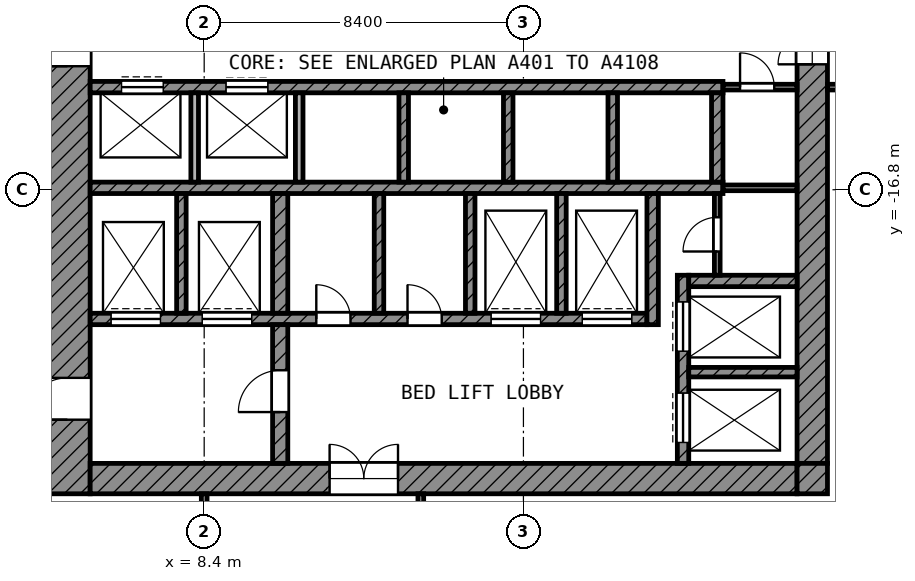
"""IFC4 building model, lengths in metres.
Left out: names, types, materials, properties, quantities, classifications, styles, units other than length and angle.
Written with IfcOpenShell. Run it as: python <this file> out.ifc"""

import sys

from ifc_helpers import new_model, si_unit, direction, frame, frame_2d, origin, place, context, subcontext, project, spatial, rectangle, extrude, element, fill, save


model = new_model("IFC4")
c1 = context("Model", 3, precision=1e-05, world=origin(), true_north=direction((0.0, 1.0)))
c2 = subcontext(c1, "Body", "Model", "MODEL_VIEW")
j1 = project(units=[si_unit("LENGTHUNIT", "METRE"), si_unit("PLANEANGLEUNIT", "RADIAN")], contexts=[c1])
p1 = place(None, origin())
s1 = spatial("IfcSite", under=j1, at=p1, CompositionType="ELEMENT")
p2 = place(p1, origin())
s2 = spatial("IfcBuilding", under=s1, at=p2, CompositionType="ELEMENT")
p3 = place(p2, frame((0.0, 0.0, 239.0)))
s3 = spatial("IfcBuildingStorey", under=s2, at=p3, CompositionType="ELEMENT", Elevation=239.0)
p4 = place(p3, frame((4.8, -24.8, 0.0), z_axis=(0.0, 0.0, 1.0), x_axis=(0.0, 1.0, 0.0)))
e1 = element("IfcWall", 1, at=p4, inside=s3, PredefinedType="SHEAR", context=c2, shape_type="SweptSolid", body=[
    extrude(rectangle(XDim=19.4, YDim=1.2, at=frame_2d((9.7, 0.0))), origin(), (0.0, 0.0, 1.0), 3.6),
])
p5 = place(p4, frame((11.25, 0.0, 0.0)))
e2 = element("IfcOpeningElement", 2, at=p5, cuts=e1, PredefinedType="OPENING", context=c2, shape_type="SweptSolid", body=[
    extrude(rectangle(XDim=1.1, YDim=2.1, at=frame_2d((0.55, 1.05))), frame((0.0, 0.61, 0.0), z_axis=(0.0, -1.0, 0.0), x_axis=(1.0, 0.0, 0.0)), (0.0, 0.0, 1.0), 1.22),
])
p6 = place(p4, frame((1.95, 0.0, 0.0)))
e3 = element("IfcOpeningElement", 3, at=p6, cuts=e1, PredefinedType="OPENING", context=c2, shape_type="SweptSolid", body=[
    extrude(rectangle(XDim=1.1, YDim=2.1, at=frame_2d((0.55, 1.05))), frame((0.0, 0.61, 0.0), z_axis=(0.0, -1.0, 0.0), x_axis=(1.0, 0.0, 0.0)), (0.0, 0.0, 1.0), 1.22),
])
p7 = place(p3, frame((24.4, -24.0, 0.0), z_axis=(0.0, 0.0, 1.0), x_axis=(0.0, 1.0, 0.0)))
e4 = element("IfcWall", 4, at=p7, inside=s3, PredefinedType="SHEAR", context=c2, shape_type="SweptSolid", body=[
    extrude(rectangle(XDim=18.6, YDim=0.8, at=frame_2d((9.3, 0.0))), origin(), (0.0, 0.0, 1.0), 3.6),
])
p8 = place(p7, frame((10.5, 0.0, 0.0)))
e5 = element("IfcOpeningElement", 5, at=p8, cuts=e4, PredefinedType="OPENING", context=c2, shape_type="SweptSolid", body=[
    extrude(rectangle(XDim=1.8, YDim=2.1, at=frame_2d((0.9, 1.05))), frame((0.0, 0.41, 0.0), z_axis=(0.0, -1.0, 0.0), x_axis=(1.0, 0.0, 0.0)), (0.0, 0.0, 1.0), 0.82),
])
p9 = place(p3, frame((5.4, -24.4, 0.0), z_axis=(0.0, 0.0, 1.0), x_axis=(1.0, 0.0, 0.0)))
e6 = element("IfcWall", 6, at=p9, inside=s3, PredefinedType="SHEAR", context=c2, shape_type="SweptSolid", body=[
    extrude(rectangle(XDim=18.6, YDim=0.8, at=frame_2d((9.3, 0.0))), origin(), (0.0, 0.0, 1.0), 3.6),
])
p10 = place(p9, frame((6.3, 0.0, 0.0)))
e7 = element("IfcOpeningElement", 7, at=p10, cuts=e6, PredefinedType="OPENING", context=c2, shape_type="SweptSolid", body=[
    extrude(rectangle(XDim=1.8, YDim=2.1, at=frame_2d((0.9, 1.05))), frame((0.0, 0.41, 0.0), z_axis=(0.0, -1.0, 0.0), x_axis=(1.0, 0.0, 0.0)), (0.0, 0.0, 1.0), 0.82),
])
p11 = place(p3, frame((24.4, -24.8, 0.0), z_axis=(0.0, 0.0, 1.0), x_axis=(0.0, 1.0, 0.0)))
e8 = element("IfcWall", 8, at=p11, inside=s3, PredefinedType="SHEAR", context=c2, shape_type="SweptSolid", body=[
    extrude(rectangle(XDim=0.8, YDim=0.8, at=frame_2d((0.4, 0.0))), origin(), (0.0, 0.0, 1.0), 3.6),
])
p12 = place(p3, frame((5.4, -14.1, 0.0), z_axis=(0.0, 0.0, 1.0), x_axis=(1.0, 0.0, 0.0)))
e9 = element("IfcWall", 9, at=p12, inside=s3, PredefinedType="SHEAR", context=c2, shape_type="SweptSolid", body=[
    extrude(rectangle(XDim=16.65, YDim=0.3, at=frame_2d((8.325, 0.0))), origin(), (0.0, 0.0, 1.0), 3.6),
])
p13 = place(p12, frame((0.825, 0.0, 0.0)))
e10 = element("IfcOpeningElement", 10, at=p13, cuts=e9, PredefinedType="OPENING", context=c2, shape_type="SweptSolid", body=[
    extrude(rectangle(XDim=1.1, YDim=2.1, at=frame_2d((0.55, 1.05))), frame((0.0, 0.16, 0.0), z_axis=(0.0, -1.0, 0.0), x_axis=(1.0, 0.0, 0.0)), (0.0, 0.0, 1.0), 0.32),
])
p14 = place(p12, frame((3.575, 0.0, 0.0)))
e11 = element("IfcOpeningElement", 11, at=p14, cuts=e9, PredefinedType="OPENING", context=c2, shape_type="SweptSolid", body=[
    extrude(rectangle(XDim=1.1, YDim=2.1, at=frame_2d((0.55, 1.05))), frame((0.0, 0.16, 0.0), z_axis=(0.0, -1.0, 0.0), x_axis=(1.0, 0.0, 0.0)), (0.0, 0.0, 1.0), 0.32),
])
p15 = place(p3, frame((5.4, -16.75, 0.0), z_axis=(0.0, 0.0, 1.0), x_axis=(1.0, 0.0, 0.0)))
e12 = element("IfcWall", 12, at=p15, inside=s3, PredefinedType="SHEAR", context=c2, shape_type="SweptSolid", body=[
    extrude(rectangle(XDim=16.65, YDim=0.3, at=frame_2d((8.325, 0.0))), origin(), (0.0, 0.0, 1.0), 3.6),
])
p16 = place(p3, frame((5.4, -20.2, 0.0), z_axis=(0.0, 0.0, 1.0), x_axis=(1.0, 0.0, 0.0)))
e13 = element("IfcWall", 13, at=p16, inside=s3, PredefinedType="SHEAR", context=c2, shape_type="SweptSolid", body=[
    extrude(rectangle(XDim=14.65, YDim=0.3, at=frame_2d((7.325, 0.0))), origin(), (0.0, 0.0, 1.0), 3.6),
])
p17 = place(p16, frame((10.55, 0.0, 0.0)))
e14 = element("IfcOpeningElement", 14, at=p17, cuts=e13, PredefinedType="OPENING", context=c2, shape_type="SweptSolid", body=[
    extrude(rectangle(XDim=1.3, YDim=2.1, at=frame_2d((0.65, 1.05))), frame((0.0, 0.16, 0.0), z_axis=(0.0, -1.0, 0.0), x_axis=(1.0, 0.0, 0.0)), (0.0, 0.0, 1.0), 0.32),
])
p18 = place(p16, frame((12.95, 0.0, 0.0)))
e15 = element("IfcOpeningElement", 15, at=p18, cuts=e13, PredefinedType="OPENING", context=c2, shape_type="SweptSolid", body=[
    extrude(rectangle(XDim=1.3, YDim=2.1, at=frame_2d((0.65, 1.05))), frame((0.0, 0.16, 0.0), z_axis=(0.0, -1.0, 0.0), x_axis=(1.0, 0.0, 0.0)), (0.0, 0.0, 1.0), 0.32),
])
p19 = place(p16, frame((0.55, 0.0, 0.0)))
e16 = element("IfcOpeningElement", 16, at=p19, cuts=e13, PredefinedType="OPENING", context=c2, shape_type="SweptSolid", body=[
    extrude(rectangle(XDim=1.3, YDim=2.1, at=frame_2d((0.65, 1.05))), frame((0.0, 0.16, 0.0), z_axis=(0.0, -1.0, 0.0), x_axis=(1.0, 0.0, 0.0)), (0.0, 0.0, 1.0), 0.32),
])
p20 = place(p16, frame((2.95, 0.0, 0.0)))
e17 = element("IfcOpeningElement", 17, at=p20, cuts=e13, PredefinedType="OPENING", context=c2, shape_type="SweptSolid", body=[
    extrude(rectangle(XDim=1.3, YDim=2.1, at=frame_2d((0.65, 1.05))), frame((0.0, 0.16, 0.0), z_axis=(0.0, -1.0, 0.0), x_axis=(1.0, 0.0, 0.0)), (0.0, 0.0, 1.0), 0.32),
])
p21 = place(p16, frame((5.95, 0.0, 0.0)))
e18 = element("IfcOpeningElement", 18, at=p21, cuts=e13, PredefinedType="OPENING", context=c2, shape_type="SweptSolid", body=[
    extrude(rectangle(XDim=0.9, YDim=2.1, at=frame_2d((0.45, 1.05))), frame((0.0, 0.16, 0.0), z_axis=(0.0, -1.0, 0.0), x_axis=(1.0, 0.0, 0.0)), (0.0, 0.0, 1.0), 0.32),
])
p22 = place(p16, frame((8.35, 0.0, 0.0)))
e19 = element("IfcOpeningElement", 19, at=p22, cuts=e13, PredefinedType="OPENING", context=c2, shape_type="SweptSolid", body=[
    extrude(rectangle(XDim=0.9, YDim=2.1, at=frame_2d((0.45, 1.05))), frame((0.0, 0.16, 0.0), z_axis=(0.0, -1.0, 0.0), x_axis=(1.0, 0.0, 0.0)), (0.0, 0.0, 1.0), 0.32),
])
p23 = place(p3, frame((10.4, -24.0, 0.0), z_axis=(0.0, 0.0, 1.0), x_axis=(0.0, 1.0, 0.0)))
e20 = element("IfcWall", 20, at=p23, inside=s3, PredefinedType="SHEAR", context=c2, shape_type="SweptSolid", body=[
    extrude(rectangle(XDim=3.65, YDim=0.4, at=frame_2d((1.825, 0.0))), origin(), (0.0, 0.0, 1.0), 3.6),
])
p24 = place(p23, frame((1.35, 0.0, 0.0)))
e21 = element("IfcOpeningElement", 21, at=p24, cuts=e20, PredefinedType="OPENING", context=c2, shape_type="SweptSolid", body=[
    extrude(rectangle(XDim=1.1, YDim=2.1, at=frame_2d((0.55, 1.05))), frame((0.0, 0.21, 0.0), z_axis=(0.0, -1.0, 0.0), x_axis=(1.0, 0.0, 0.0)), (0.0, 0.0, 1.0), 0.42),
])
p25 = place(p3, frame((10.4, -20.05, 0.0), z_axis=(0.0, 0.0, 1.0), x_axis=(0.0, 1.0, 0.0)))
e22 = element("IfcWall", 22, at=p25, inside=s3, PredefinedType="SHEAR", context=c2, shape_type="SweptSolid", body=[
    extrude(rectangle(XDim=3.15, YDim=0.4, at=frame_2d((1.575, 0.0))), origin(), (0.0, 0.0, 1.0), 3.6),
])
p26 = place(p3, frame((20.2, -20.35, 0.0), z_axis=(0.0, 0.0, 1.0), x_axis=(0.0, 1.0, 0.0)))
e23 = element("IfcWall", 23, at=p26, inside=s3, PredefinedType="SHEAR", context=c2, shape_type="SweptSolid", body=[
    extrude(rectangle(XDim=3.45, YDim=0.3, at=frame_2d((1.725, 0.0))), origin(), (0.0, 0.0, 1.0), 3.6),
])
p27 = place(p3, frame((21.9, -16.6, 0.0), z_axis=(0.0, 0.0, 1.0), x_axis=(0.0, 1.0, 0.0)))
e24 = element("IfcWall", 24, at=p27, inside=s3, PredefinedType="SHEAR", context=c2, shape_type="SweptSolid", body=[
    extrude(rectangle(XDim=2.35, YDim=0.3, at=frame_2d((1.175, 0.0))), origin(), (0.0, 0.0, 1.0), 3.6),
])
p28 = place(p3, frame((21.15, -19.2, 0.0), z_axis=(0.0, 0.0, 1.0), x_axis=(1.0, 0.0, 0.0)))
e25 = element("IfcWall", 25, at=p28, inside=s3, PredefinedType="SHEAR", context=c2, shape_type="SweptSolid", body=[
    extrude(rectangle(XDim=2.85, YDim=0.3, at=frame_2d((1.425, 0.0))), origin(), (0.0, 0.0, 1.0), 3.6),
])
p29 = place(p3, frame((21.0, -24.0, 0.0), z_axis=(0.0, 0.0, 1.0), x_axis=(0.0, 1.0, 0.0)))
e26 = element("IfcWall", 26, at=p29, inside=s3, PredefinedType="SHEAR", context=c2, shape_type="SweptSolid", body=[
    extrude(rectangle(XDim=4.95, YDim=0.3, at=frame_2d((2.475, 0.0))), origin(), (0.0, 0.0, 1.0), 3.6),
])
p30 = place(p29, frame((2.95, 0.0, 0.0)))
e27 = element("IfcOpeningElement", 27, at=p30, cuts=e26, PredefinedType="OPENING", context=c2, shape_type="SweptSolid", body=[
    extrude(rectangle(XDim=1.3, YDim=2.1, at=frame_2d((0.65, 1.05))), frame((0.0, 0.16, 0.0), z_axis=(0.0, -1.0, 0.0), x_axis=(1.0, 0.0, 0.0)), (0.0, 0.0, 1.0), 0.32),
])
p31 = place(p29, frame((0.55, 0.0, 0.0)))
e28 = element("IfcOpeningElement", 28, at=p31, cuts=e26, PredefinedType="OPENING", context=c2, shape_type="SweptSolid", body=[
    extrude(rectangle(XDim=1.3, YDim=2.1, at=frame_2d((0.65, 1.05))), frame((0.0, 0.16, 0.0), z_axis=(0.0, -1.0, 0.0), x_axis=(1.0, 0.0, 0.0)), (0.0, 0.0, 1.0), 0.32),
])
p32 = place(p3, frame((21.15, -21.6, 0.0), z_axis=(0.0, 0.0, 1.0), x_axis=(1.0, 0.0, 0.0)))
e29 = element("IfcWall", 29, at=p32, inside=s3, PredefinedType="SHEAR", context=c2, shape_type="SweptSolid", body=[
    extrude(rectangle(XDim=2.85, YDim=0.25, at=frame_2d((1.425, 0.0))), origin(), (0.0, 0.0, 1.0), 3.6),
])
for number, where, z_axis, x_axis in (
    (30, (7.8, -20.05, 0.0), (0.0, 0.0, 1.0), (0.0, 1.0, 0.0)),
    (31, (13.0, -20.05, 0.0), (0.0, 0.0, 1.0), (0.0, 1.0, 0.0)),
    (32, (15.4, -20.05, 0.0), (0.0, 0.0, 1.0), (0.0, 1.0, 0.0)),
    (33, (17.8, -20.05, 0.0), (0.0, 0.0, 1.0), (0.0, 1.0, 0.0)),
):
    element("IfcWall", number, at=place(p3, frame(where, z_axis=z_axis, x_axis=x_axis)), inside=s3, PredefinedType="SHEAR", context=c2, shape_type="SweptSolid", body=[
        extrude(rectangle(XDim=3.15, YDim=0.25, at=frame_2d((1.575, 0.0))), origin(), (0.0, 0.0, 1.0), 3.6),
    ])
for number, where, z_axis, x_axis in (
    (34, (8.15, -16.6, 0.0), (0.0, 0.0, 1.0), (0.0, 1.0, 0.0)),
    (35, (10.9, -16.6, 0.0), (0.0, 0.0, 1.0), (0.0, 1.0, 0.0)),
):
    element("IfcWall", number, at=place(p3, frame(where, z_axis=z_axis, x_axis=x_axis)), inside=s3, PredefinedType="PARTITIONING", context=c2, shape_type="SweptSolid", body=[
        extrude(rectangle(XDim=2.35, YDim=0.2, at=frame_2d((1.175, 0.0))), origin(), (0.0, 0.0, 1.0), 3.6),
    ])
for number, where, z_axis, x_axis in (
    (36, (13.65, -16.6, 0.0), (0.0, 0.0, 1.0), (0.0, 1.0, 0.0)),
    (37, (16.4, -16.6, 0.0), (0.0, 0.0, 1.0), (0.0, 1.0, 0.0)),
    (38, (19.15, -16.6, 0.0), (0.0, 0.0, 1.0), (0.0, 1.0, 0.0)),
):
    element("IfcWall", number, at=place(p3, frame(where, z_axis=z_axis, x_axis=x_axis)), inside=s3, PredefinedType="SHEAR", context=c2, shape_type="SweptSolid", body=[
        extrude(rectangle(XDim=2.35, YDim=0.25, at=frame_2d((1.175, 0.0))), origin(), (0.0, 0.0, 1.0), 3.6),
    ])
p33 = place(p3, frame((21.9, -19.05, 0.0), z_axis=(0.0, 0.0, 1.0), x_axis=(0.0, 1.0, 0.0)))
e39 = element("IfcWall", 39, at=p33, inside=s3, PredefinedType="PARTITIONING", context=c2, shape_type="SweptSolid", body=[
    extrude(rectangle(XDim=2.15, YDim=0.15, at=frame_2d((1.075, 0.0))), origin(), (0.0, 0.0, 1.0), 3.6),
])
p34 = place(p33, frame((0.625, 0.0, 0.0)))
e40 = element("IfcOpeningElement", 40, at=p34, cuts=e39, PredefinedType="OPENING", context=c2, shape_type="SweptSolid", body=[
    extrude(rectangle(XDim=0.9, YDim=2.1, at=frame_2d((0.45, 1.05))), frame((0.0, 0.085, 0.0), z_axis=(0.0, -1.0, 0.0), x_axis=(1.0, 0.0, 0.0)), (0.0, 0.0, 1.0), 0.17),
])
p35 = place(p3, frame((22.05, -16.75, 0.0), z_axis=(0.0, 0.0, 1.0), x_axis=(1.0, 0.0, 0.0)))
e41 = element("IfcWall", 41, at=p35, inside=s3, PredefinedType="PARTITIONING", context=c2, shape_type="SweptSolid", body=[
    extrude(rectangle(XDim=1.95, YDim=0.15, at=frame_2d((0.975, 0.0))), origin(), (0.0, 0.0, 1.0), 3.6),
])
p36 = place(p3, frame((22.05, -14.1, 0.0), z_axis=(0.0, 0.0, 1.0), x_axis=(1.0, 0.0, 0.0)))
e42 = element("IfcWall", 42, at=p36, inside=s3, PredefinedType="PARTITIONING", context=c2, shape_type="SweptSolid", body=[
    extrude(rectangle(XDim=1.95, YDim=0.15, at=frame_2d((0.975, 0.0))), origin(), (0.0, 0.0, 1.0), 3.6),
])
p37 = place(p36, frame((0.45, 0.0, 0.0)))
e43 = element("IfcOpeningElement", 43, at=p37, cuts=e42, PredefinedType="OPENING", context=c2, shape_type="SweptSolid", body=[
    extrude(rectangle(XDim=0.9, YDim=2.1, at=frame_2d((0.45, 1.05))), frame((0.0, 0.085, 0.0), z_axis=(0.0, -1.0, 0.0), x_axis=(1.0, 0.0, 0.0)), (0.0, 0.0, 1.0), 0.17),
])
p38 = place(p3, frame((24.8, -14.1, 0.0), z_axis=(0.0, 0.0, 1.0), x_axis=(1.0, 0.0, 0.0)))
e44 = element("IfcWall", 44, at=p38, inside=s3, PredefinedType="PARTITIONING", context=c2, shape_type="SweptSolid", body=[
    extrude(rectangle(XDim=4.525, YDim=0.15, at=frame_2d((2.262, 0.0))), origin(), (0.0, 0.0, 1.0), 3.6),
])
p39 = place(p38, frame((1.75, 0.0, 0.0)))
e45 = element("IfcOpeningElement", 45, at=p39, cuts=e44, PredefinedType="OPENING", context=c2, shape_type="SweptSolid", body=[
    extrude(rectangle(XDim=1.5, YDim=2.1, at=frame_2d((0.75, 1.05))), frame((0.0, 0.085, 0.0), z_axis=(0.0, -1.0, 0.0), x_axis=(1.0, 0.0, 0.0)), (0.0, 0.0, 1.0), 0.17),
])
p40 = place(p3, frame((8.4, -31.907, 0.0), z_axis=(0.0, 0.0, 1.0), x_axis=(0.0, 1.0, 0.0)))
e46 = element("IfcWall", 46, at=p40, inside=s3, PredefinedType="PARTITIONING", context=c2, shape_type="SweptSolid", body=[
    extrude(rectangle(XDim=7.107, YDim=0.15, at=frame_2d((3.553, 0.0))), origin(), (0.0, 0.0, 1.0), 3.6),
])
p41 = place(p3, frame((14.1, -29.325, 0.0), z_axis=(0.0, 0.0, 1.0), x_axis=(0.0, 1.0, 0.0)))
e47 = element("IfcWall", 47, at=p41, inside=s3, PredefinedType="PARTITIONING", context=c2, shape_type="SweptSolid", body=[
    extrude(rectangle(XDim=4.525, YDim=0.15, at=frame_2d((2.262, 0.0))), origin(), (0.0, 0.0, 1.0), 3.6),
])
p42 = place(p13, origin())
e48 = element("IfcDoor", 48, at=p42, inside=s3, OperationType="DOUBLE_DOOR_SLIDING", PredefinedType="DOOR", context=c2, shape_type="SweptSolid", body=[
    extrude(rectangle(XDim=1.1, YDim=2.1, at=frame_2d((0.55, 1.05))), frame((0.0, 0.025, 0.0), z_axis=(0.0, -1.0, 0.0), x_axis=(1.0, 0.0, 0.0)), (0.0, 0.0, 1.0), 0.05),
])
fill(e10, e48)
p43 = place(p14, origin())
e49 = element("IfcDoor", 49, at=p43, inside=s3, OperationType="DOUBLE_DOOR_SLIDING", PredefinedType="DOOR", context=c2, shape_type="SweptSolid", body=[
    extrude(rectangle(XDim=1.1, YDim=2.1, at=frame_2d((0.55, 1.05))), frame((0.0, 0.025, 0.0), z_axis=(0.0, -1.0, 0.0), x_axis=(1.0, 0.0, 0.0)), (0.0, 0.0, 1.0), 0.05),
])
fill(e11, e49)
p44 = place(p30, origin())
e50 = element("IfcDoor", 50, at=p44, inside=s3, OperationType="DOUBLE_DOOR_SLIDING", PredefinedType="DOOR", context=c2, shape_type="SweptSolid", body=[
    extrude(rectangle(XDim=1.3, YDim=2.1, at=frame_2d((0.65, 1.05))), frame((0.0, 0.025, 0.0), z_axis=(0.0, -1.0, 0.0), x_axis=(1.0, 0.0, 0.0)), (0.0, 0.0, 1.0), 0.05),
])
fill(e27, e50)
p45 = place(p31, origin())
e51 = element("IfcDoor", 51, at=p45, inside=s3, OperationType="DOUBLE_DOOR_SLIDING", PredefinedType="DOOR", context=c2, shape_type="SweptSolid", body=[
    extrude(rectangle(XDim=1.3, YDim=2.1, at=frame_2d((0.65, 1.05))), frame((0.0, 0.025, 0.0), z_axis=(0.0, -1.0, 0.0), x_axis=(1.0, 0.0, 0.0)), (0.0, 0.0, 1.0), 0.05),
])
fill(e28, e51)
p46 = place(p17, origin())
e52 = element("IfcDoor", 52, at=p46, inside=s3, OperationType="DOUBLE_DOOR_SLIDING", PredefinedType="DOOR", context=c2, shape_type="SweptSolid", body=[
    extrude(rectangle(XDim=1.3, YDim=2.1, at=frame_2d((0.65, 1.05))), frame((0.0, 0.025, 0.0), z_axis=(0.0, -1.0, 0.0), x_axis=(1.0, 0.0, 0.0)), (0.0, 0.0, 1.0), 0.05),
])
fill(e14, e52)
p47 = place(p18, origin())
e53 = element("IfcDoor", 53, at=p47, inside=s3, OperationType="DOUBLE_DOOR_SLIDING", PredefinedType="DOOR", context=c2, shape_type="SweptSolid", body=[
    extrude(rectangle(XDim=1.3, YDim=2.1, at=frame_2d((0.65, 1.05))), frame((0.0, 0.025, 0.0), z_axis=(0.0, -1.0, 0.0), x_axis=(1.0, 0.0, 0.0)), (0.0, 0.0, 1.0), 0.05),
])
fill(e15, e53)
p48 = place(p19, origin())
e54 = element("IfcDoor", 54, at=p48, inside=s3, OperationType="DOUBLE_DOOR_SLIDING", PredefinedType="DOOR", context=c2, shape_type="SweptSolid", body=[
    extrude(rectangle(XDim=1.3, YDim=2.1, at=frame_2d((0.65, 1.05))), frame((0.0, 0.025, 0.0), z_axis=(0.0, -1.0, 0.0), x_axis=(1.0, 0.0, 0.0)), (0.0, 0.0, 1.0), 0.05),
])
fill(e16, e54)
p49 = place(p20, origin())
e55 = element("IfcDoor", 55, at=p49, inside=s3, OperationType="DOUBLE_DOOR_SLIDING", PredefinedType="DOOR", context=c2, shape_type="SweptSolid", body=[
    extrude(rectangle(XDim=1.3, YDim=2.1, at=frame_2d((0.65, 1.05))), frame((0.0, 0.025, 0.0), z_axis=(0.0, -1.0, 0.0), x_axis=(1.0, 0.0, 0.0)), (0.0, 0.0, 1.0), 0.05),
])
fill(e17, e55)
p50 = place(p5, origin())
e56 = element("IfcDoor", 56, at=p50, inside=s3, OperationType="SINGLE_SWING_LEFT", PredefinedType="DOOR", context=c2, shape_type="SweptSolid", body=[
    extrude(rectangle(XDim=1.1, YDim=2.1, at=frame_2d((0.55, 1.05))), frame((0.0, 0.025, 0.0), z_axis=(0.0, -1.0, 0.0), x_axis=(1.0, 0.0, 0.0)), (0.0, 0.0, 1.0), 0.05),
])
fill(e2, e56)
p51 = place(p6, origin())
e57 = element("IfcDoor", 57, at=p51, inside=s3, OperationType="SINGLE_SWING_LEFT", PredefinedType="DOOR", context=c2, shape_type="SweptSolid", body=[
    extrude(rectangle(XDim=1.1, YDim=2.1, at=frame_2d((0.55, 1.05))), frame((0.0, 0.025, 0.0), z_axis=(0.0, -1.0, 0.0), x_axis=(1.0, 0.0, 0.0)), (0.0, 0.0, 1.0), 0.05),
])
fill(e3, e57)
p52 = place(p24, origin())
e58 = element("IfcDoor", 58, at=p52, inside=s3, OperationType="SINGLE_SWING_LEFT", PredefinedType="DOOR", context=c2, shape_type="SweptSolid", body=[
    extrude(rectangle(XDim=1.1, YDim=2.1, at=frame_2d((0.55, 1.05))), frame((0.0, 0.025, 0.0), z_axis=(0.0, -1.0, 0.0), x_axis=(1.0, 0.0, 0.0)), (0.0, 0.0, 1.0), 0.05),
])
fill(e21, e58)
p53 = place(p8, origin())
e59 = element("IfcDoor", 59, at=p53, inside=s3, OperationType="DOUBLE_DOOR_SINGLE_SWING", PredefinedType="DOOR", context=c2, shape_type="SweptSolid", body=[
    extrude(rectangle(XDim=1.8, YDim=2.1, at=frame_2d((0.9, 1.05))), frame((0.0, 0.025, 0.0), z_axis=(0.0, -1.0, 0.0), x_axis=(1.0, 0.0, 0.0)), (0.0, 0.0, 1.0), 0.05),
])
fill(e5, e59)
p54 = place(p10, origin())
e60 = element("IfcDoor", 60, at=p54, inside=s3, OperationType="DOUBLE_DOOR_SINGLE_SWING", PredefinedType="DOOR", context=c2, shape_type="SweptSolid", body=[
    extrude(rectangle(XDim=1.8, YDim=2.1, at=frame_2d((0.9, 1.05))), frame((0.0, 0.025, 0.0), z_axis=(0.0, -1.0, 0.0), x_axis=(1.0, 0.0, 0.0)), (0.0, 0.0, 1.0), 0.05),
])
fill(e7, e60)
p55 = place(p37, origin())
e61 = element("IfcDoor", 61, at=p55, inside=s3, OperationType="SINGLE_SWING_LEFT", PredefinedType="DOOR", context=c2, shape_type="SweptSolid", body=[
    extrude(rectangle(XDim=0.9, YDim=2.1, at=frame_2d((0.45, 1.05))), frame((0.0, 0.025, 0.0), z_axis=(0.0, -1.0, 0.0), x_axis=(1.0, 0.0, 0.0)), (0.0, 0.0, 1.0), 0.05),
])
fill(e43, e61)
p56 = place(p34, origin())
e62 = element("IfcDoor", 62, at=p56, inside=s3, OperationType="SINGLE_SWING_LEFT", PredefinedType="DOOR", context=c2, shape_type="SweptSolid", body=[
    extrude(rectangle(XDim=0.9, YDim=2.1, at=frame_2d((0.45, 1.05))), frame((0.0, 0.025, 0.0), z_axis=(0.0, -1.0, 0.0), x_axis=(1.0, 0.0, 0.0)), (0.0, 0.0, 1.0), 0.05),
])
fill(e40, e62)
p57 = place(p21, origin())
e63 = element("IfcDoor", 63, at=p57, inside=s3, OperationType="SINGLE_SWING_LEFT", PredefinedType="DOOR", context=c2, shape_type="SweptSolid", body=[
    extrude(rectangle(XDim=0.9, YDim=2.1, at=frame_2d((0.45, 1.05))), frame((0.0, 0.025, 0.0), z_axis=(0.0, -1.0, 0.0), x_axis=(1.0, 0.0, 0.0)), (0.0, 0.0, 1.0), 0.05),
])
fill(e18, e63)
p58 = place(p22, origin())
e64 = element("IfcDoor", 64, at=p58, inside=s3, OperationType="SINGLE_SWING_LEFT", PredefinedType="DOOR", context=c2, shape_type="SweptSolid", body=[
    extrude(rectangle(XDim=0.9, YDim=2.1, at=frame_2d((0.45, 1.05))), frame((0.0, 0.025, 0.0), z_axis=(0.0, -1.0, 0.0), x_axis=(1.0, 0.0, 0.0)), (0.0, 0.0, 1.0), 0.05),
])
fill(e19, e64)
save(model, sys.argv[1])
